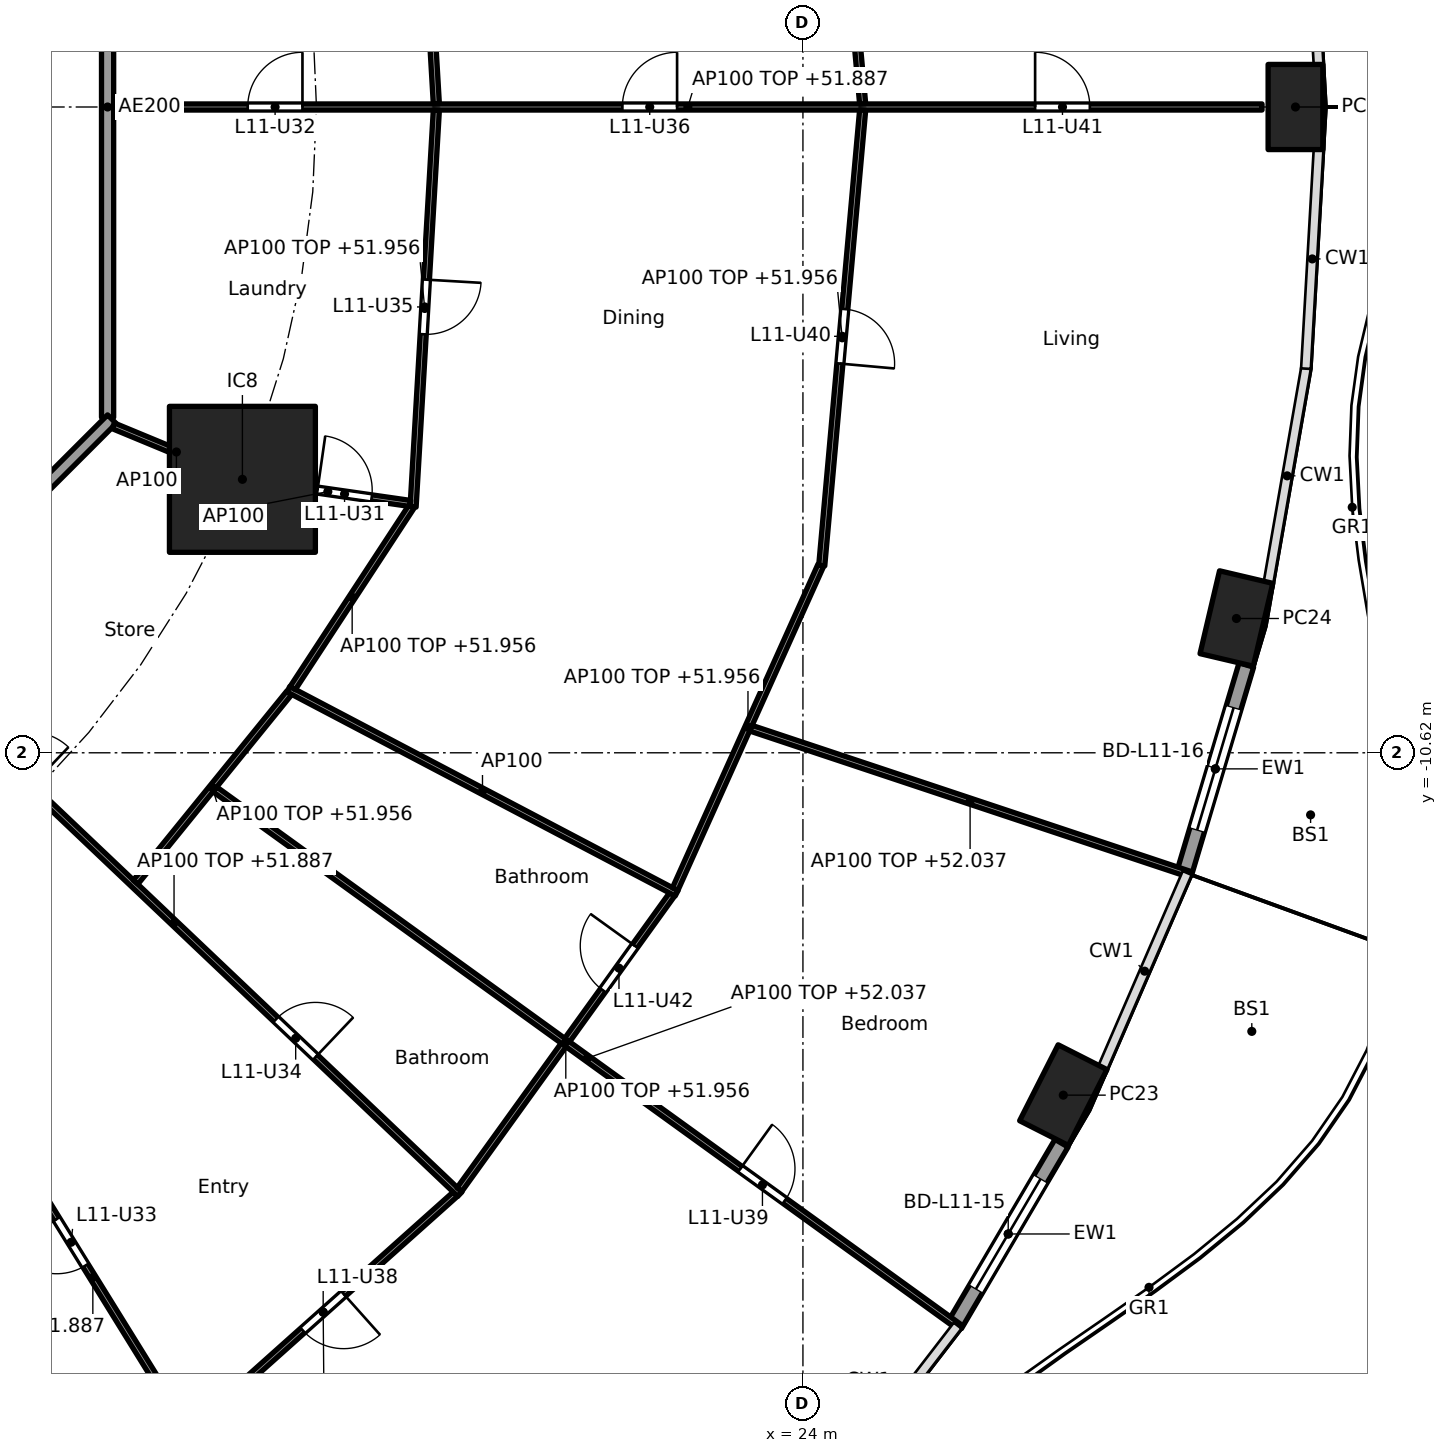
"""IFC4 building model, lengths in metres.
Left out: names, types, materials, properties, quantities, classifications, styles, units other than length and angle.
Written with IfcOpenShell. Run it as: python <this file> out.ifc"""

import sys

from ifc_helpers import new_model, si_unit, direction, frame, frame_2d, origin, origin_2d, place, context, subcontext, project, spatial, rectangle, hollow_rectangle, extrude, element, fill, save


model = new_model("IFC4")
c1 = context("Model", 3, precision=1e-05, world=origin(), true_north=direction((0.0, 1.0)))
c2 = subcontext(c1, "Body", "Model", "MODEL_VIEW")
j1 = project(units=[si_unit("LENGTHUNIT", "METRE"), si_unit("PLANEANGLEUNIT", "RADIAN")], contexts=[c1])
p1 = place(None, origin())
s1 = spatial("IfcSite", under=j1, at=p1, CompositionType="ELEMENT")
p2 = place(p1, origin())
s2 = spatial("IfcBuilding", under=s1, at=p2, CompositionType="ELEMENT")
p3 = place(p2, frame((0.0, 0.0, 49.2)))
s3 = spatial("IfcBuildingStorey", under=s2, at=p3, CompositionType="ELEMENT", Elevation=49.2)
for number, where, z_axis, x_axis in (
    (1, (32.1, 0.0, 0.0), (0.0, 0.0, 1.0), (0.0, 1.0, 0.0)),
    (2, (28.282, -16.25, 0.0), (0.0, 0.0, 1.0), (0.452, 0.892, 0.0)),
    (3, (31.129, -8.412, 0.0), (0.0, 0.0, 1.0), (0.229, 0.973, 0.0)),
):
    element("IfcColumn", number, at=place(p3, frame(where, z_axis=z_axis, x_axis=x_axis)), inside=s3, PredefinedType="COLUMN", context=c2, shape_type="SweptSolid", body=[
        extrude(hollow_rectangle(XDim=1.4, YDim=0.9, WallThickness=0.05, at=origin_2d()), origin(), (0.0, 0.0, 1.0), 3.7),
    ])
p4 = place(p3, frame((14.782, -6.123, 0.0), z_axis=(0.0, 0.0, 1.0), x_axis=(1.0, 0.0, 0.0)))
e4 = element("IfcColumn", 4, at=p4, inside=s3, PredefinedType="COLUMN", context=c2, shape_type="SweptSolid", body=[
    extrude(rectangle(XDim=2.4, YDim=2.4, at=origin_2d()), origin(), (0.0, 0.0, 1.0), 3.7),
])
p5 = place(p3, frame((28.252, -17.04, 0.0), z_axis=(0.0, 0.0, 1.0), x_axis=(-0.506311160839, -0.862350861546, 0.0)))
e5 = element("IfcWall", 5, at=p5, inside=s3, PredefinedType="SOLIDWALL", context=c2, shape_type="SweptSolid", body=[
    extrude(rectangle(XDim=3.462, YDim=0.25, at=frame_2d((1.731, 0.0))), origin(), (0.0, 0.0, 1.0), 3.44),
])
p6 = place(p5, frame((0.681, 0.0, 0.0)))
e6 = element("IfcOpeningElement", 6, at=p6, cuts=e5, PredefinedType="OPENING", context=c2, shape_type="SweptSolid", body=[
    extrude(rectangle(XDim=2.1, YDim=2.4, at=frame_2d((1.05, 1.2))), frame((0.0, 0.135, 0.0), z_axis=(0.0, -1.0, 0.0), x_axis=(1.0, 0.0, 0.0)), (0.0, 0.0, 1.0), 0.27),
])
p7 = place(p3, frame((31.292, -9.176, 0.0), z_axis=(0.0, 0.0, 1.0), x_axis=(-0.285871309426, -0.958268018065, 0.0)))
e7 = element("IfcWall", 7, at=p7, inside=s3, PredefinedType="SOLIDWALL", context=c2, shape_type="SweptSolid", body=[
    extrude(rectangle(XDim=3.565, YDim=0.25, at=frame_2d((1.783, 0.0))), origin(), (0.0, 0.0, 1.0), 3.44),
])
p8 = place(p7, frame((0.733, 0.0, 0.0)))
e8 = element("IfcOpeningElement", 8, at=p8, cuts=e7, PredefinedType="OPENING", context=c2, shape_type="SweptSolid", body=[
    extrude(rectangle(XDim=2.1, YDim=2.4, at=frame_2d((1.05, 1.2))), frame((0.0, 0.135, 0.0), z_axis=(0.0, -1.0, 0.0), x_axis=(1.0, 0.0, 0.0)), (0.0, 0.0, 1.0), 0.27),
])
p9 = place(p3, frame((12.565, -5.104, 0.0), z_axis=(0.0, 0.0, 1.0), x_axis=(0.0, 1.0, 0.0)))
e9 = element("IfcWall", 9, at=p9, inside=s3, PredefinedType="PARTITIONING", context=c2, shape_type="SweptSolid", body=[
    extrude(rectangle(XDim=10.209, YDim=0.2, at=frame_2d((5.104, 0.0))), origin(), (0.0, 0.0, 1.0), 3.44),
])
p10 = place(p3, frame((5.275, -12.494, 0.0), z_axis=(0.0, 0.0, 1.0), x_axis=(0.707106781187, 0.707106781187, 0.0)))
e10 = element("IfcWall", 10, at=p10, inside=s3, PredefinedType="PARTITIONING", context=c2, shape_type="SweptSolid", body=[
    extrude(rectangle(XDim=10.409, YDim=0.2, at=frame_2d((5.205, 0.0))), origin(), (0.0, 0.0, 1.0), 3.44),
])
p11 = place(p10, frame((3.303, 0.0, 0.0)))
e11 = element("IfcOpeningElement", 11, at=p11, cuts=e10, PredefinedType="OPENING", context=c2, shape_type="SweptSolid", body=[
    extrude(rectangle(XDim=1.0, YDim=2.1, at=frame_2d((0.5, 1.05))), frame((0.0, 0.11, 0.0), z_axis=(0.0, -1.0, 0.0), x_axis=(1.0, 0.0, 0.0)), (0.0, 0.0, 1.0), 0.22),
])
p12 = place(p3, frame((12.665, 0.0, 0.0), z_axis=(0.0, 0.0, 1.0), x_axis=(1.0, 0.0, 0.0)))
e12 = element("IfcWall", 12, at=p12, inside=s3, PredefinedType="PARTITIONING", context=c2, shape_type="SweptSolid", body=[
    extrude(rectangle(XDim=18.885, YDim=0.1, at=frame_2d((9.443, 0.0))), origin(), (0.0, 0.0, 1.0), 2.687),
])
p13 = place(p12, frame((2.205, 0.0, 0.0)))
e13 = element("IfcOpeningElement", 13, at=p13, cuts=e12, PredefinedType="OPENING", context=c2, shape_type="SweptSolid", body=[
    extrude(rectangle(XDim=0.9, YDim=2.1, at=frame_2d((0.45, 1.05))), frame((0.0, 0.06, 0.0), z_axis=(0.0, -1.0, 0.0), x_axis=(1.0, 0.0, 0.0)), (0.0, 0.0, 1.0), 0.12),
])
p14 = place(p12, frame((8.366, 0.0, 0.0)))
e14 = element("IfcOpeningElement", 14, at=p14, cuts=e12, PredefinedType="OPENING", context=c2, shape_type="SweptSolid", body=[
    extrude(rectangle(XDim=0.9, YDim=2.1, at=frame_2d((0.45, 1.05))), frame((0.0, 0.06, 0.0), z_axis=(0.0, -1.0, 0.0), x_axis=(1.0, 0.0, 0.0)), (0.0, 0.0, 1.0), 0.12),
])
p15 = place(p12, frame((15.154, 0.0, 0.0)))
e15 = element("IfcOpeningElement", 15, at=p15, cuts=e12, PredefinedType="OPENING", context=c2, shape_type="SweptSolid", body=[
    extrude(rectangle(XDim=0.9, YDim=2.1, at=frame_2d((0.45, 1.05))), frame((0.0, 0.06, 0.0), z_axis=(0.0, -1.0, 0.0), x_axis=(1.0, 0.0, 0.0)), (0.0, 0.0, 1.0), 0.12),
])
p16 = place(p3, frame((17.971, 0.05, 0.0), z_axis=(0.0, 0.0, 1.0), x_axis=(-0.058513659907, 0.998286607946, 0.0)))
e16 = element("IfcWall", 16, at=p16, inside=s3, PredefinedType="PARTITIONING", context=c2, shape_type="SweptSolid", body=[
    extrude(rectangle(XDim=6.388, YDim=0.1, at=frame_2d((3.194, 0.0))), origin(), (0.0, 0.0, 1.0), 2.756),
])
p17 = place(p3, frame((17.971, -0.05, 0.0), z_axis=(0.0, 0.0, 1.0), x_axis=(-0.058476853647, -0.998288764631, 0.0)))
e17 = element("IfcWall", 17, at=p17, inside=s3, PredefinedType="PARTITIONING", context=c2, shape_type="SweptSolid", body=[
    extrude(rectangle(XDim=6.538, YDim=0.1, at=frame_2d((3.269, 0.0))), origin(), (0.0, 0.0, 1.0), 2.756),
])
p18 = place(p17, frame((2.794, 0.0, 0.0)))
e18 = element("IfcOpeningElement", 18, at=p18, cuts=e17, PredefinedType="OPENING", context=c2, shape_type="SweptSolid", body=[
    extrude(rectangle(XDim=0.9, YDim=2.1, at=frame_2d((0.45, 1.05))), frame((0.0, 0.06, 0.0), z_axis=(0.0, -1.0, 0.0), x_axis=(1.0, 0.0, 0.0)), (0.0, 0.0, 1.0), 0.12),
])
p19 = place(p3, frame((24.982, 0.05, 0.0), z_axis=(0.0, 0.0, 1.0), x_axis=(-0.08944290521, 0.995991951126, 0.0)))
e19 = element("IfcWall", 19, at=p19, inside=s3, PredefinedType="PARTITIONING", context=c2, shape_type="SweptSolid", body=[
    extrude(rectangle(XDim=7.373, YDim=0.1, at=frame_2d((3.686, 0.0))), origin(), (0.0, 0.0, 1.0), 2.756),
])
p20 = place(p3, frame((24.982, -0.05, 0.0), z_axis=(0.0, 0.0, 1.0), x_axis=(-0.089444214321, -0.995991833563, 0.0)))
e20 = element("IfcWall", 20, at=p20, inside=s3, PredefinedType="PARTITIONING", context=c2, shape_type="SweptSolid", body=[
    extrude(rectangle(XDim=7.523, YDim=0.1, at=frame_2d((3.761, 0.0))), origin(), (0.0, 0.0, 1.0), 2.756),
])
p21 = place(p20, frame((3.286, 0.0, 0.0)))
e21 = element("IfcOpeningElement", 21, at=p21, cuts=e20, PredefinedType="OPENING", context=c2, shape_type="SweptSolid", body=[
    extrude(rectangle(XDim=0.9, YDim=2.1, at=frame_2d((0.45, 1.05))), frame((0.0, 0.06, 0.0), z_axis=(0.0, -1.0, 0.0), x_axis=(1.0, 0.0, 0.0)), (0.0, 0.0, 1.0), 0.12),
])
p22 = place(p3, frame((7.097, -10.81, 0.0), z_axis=(0.0, 0.0, 1.0), x_axis=(0.526453266471, -0.850204068576, 0.0)))
e22 = element("IfcWall", 22, at=p22, inside=s3, PredefinedType="PARTITIONING", context=c2, shape_type="SweptSolid", body=[
    extrude(rectangle(XDim=19.85, YDim=0.1, at=frame_2d((9.925, 0.0))), origin(), (0.0, 0.0, 1.0), 2.687),
])
p23 = place(p22, frame((0.35, 0.0, 0.0)))
e23 = element("IfcOpeningElement", 23, at=p23, cuts=e22, PredefinedType="OPENING", context=c2, shape_type="SweptSolid", body=[
    extrude(rectangle(XDim=0.9, YDim=2.1, at=frame_2d((0.45, 1.05))), frame((0.0, 0.06, 0.0), z_axis=(0.0, -1.0, 0.0), x_axis=(1.0, 0.0, 0.0)), (0.0, 0.0, 1.0), 0.12),
])
p24 = place(p22, frame((8.795, 0.0, 0.0)))
e24 = element("IfcOpeningElement", 24, at=p24, cuts=e22, PredefinedType="OPENING", context=c2, shape_type="SweptSolid", body=[
    extrude(rectangle(XDim=0.9, YDim=2.1, at=frame_2d((0.45, 1.05))), frame((0.0, 0.06, 0.0), z_axis=(0.0, -1.0, 0.0), x_axis=(1.0, 0.0, 0.0)), (0.0, 0.0, 1.0), 0.12),
])
p25 = place(p3, frame((13.936, -21.761, 0.0), z_axis=(0.0, 0.0, 1.0), x_axis=(0.745806142791, 0.666163041136, 0.0)))
e25 = element("IfcWall", 25, at=p25, inside=s3, PredefinedType="PARTITIONING", context=c2, shape_type="SweptSolid", body=[
    extrude(rectangle(XDim=5.831, YDim=0.1, at=frame_2d((2.915, 0.0))), origin(), (0.0, 0.0, 1.0), 2.756),
])
p26 = place(p25, frame((2.465, 0.0, 0.0)))
e26 = element("IfcOpeningElement", 26, at=p26, cuts=e25, PredefinedType="OPENING", context=c2, shape_type="SweptSolid", body=[
    extrude(rectangle(XDim=0.9, YDim=2.1, at=frame_2d((0.45, 1.05))), frame((0.0, 0.06, 0.0), z_axis=(0.0, -1.0, 0.0), x_axis=(1.0, 0.0, 0.0)), (0.0, 0.0, 1.0), 0.12),
])
p27 = place(p3, frame((8.957, -8.953, 0.0), z_axis=(0.0, 0.0, 1.0), x_axis=(0.725250022034, -0.688485588476, 0.0)))
e27 = element("IfcWall", 27, at=p27, inside=s3, PredefinedType="PARTITIONING", context=c2, shape_type="SweptSolid", body=[
    extrude(rectangle(XDim=12.963, YDim=0.1, at=frame_2d((6.481, 0.0))), origin(), (0.0, 0.0, 1.0), 2.687),
])
p28 = place(p27, frame((2.333, 0.0, 0.0)))
e28 = element("IfcOpeningElement", 28, at=p28, cuts=e27, PredefinedType="OPENING", context=c2, shape_type="SweptSolid", body=[
    extrude(rectangle(XDim=0.9, YDim=2.1, at=frame_2d((0.45, 1.05))), frame((0.0, 0.06, 0.0), z_axis=(0.0, -1.0, 0.0), x_axis=(1.0, 0.0, 0.0)), (0.0, 0.0, 1.0), 0.12),
])
p29 = place(p27, frame((8.79, 0.0, 0.0)))
e29 = element("IfcOpeningElement", 29, at=p29, cuts=e27, PredefinedType="OPENING", context=c2, shape_type="SweptSolid", body=[
    extrude(rectangle(XDim=0.9, YDim=2.1, at=frame_2d((0.45, 1.05))), frame((0.0, 0.06, 0.0), z_axis=(0.0, -1.0, 0.0), x_axis=(1.0, 0.0, 0.0)), (0.0, 0.0, 1.0), 0.12),
])
p30 = place(p3, frame((13.026, -12.747, 0.0), z_axis=(0.0, 0.0, 1.0), x_axis=(0.630126826288, 0.776492229705, 0.0)))
e30 = element("IfcWall", 30, at=p30, inside=s3, PredefinedType="PARTITIONING", context=c2, shape_type="SweptSolid", body=[
    extrude(rectangle(XDim=4.007, YDim=0.1, at=frame_2d((2.003, 0.0))), origin(), (0.0, 0.0, 1.0), 2.756),
])
p31 = place(p3, frame((18.351, -17.803, 0.0), z_axis=(0.0, 0.0, 1.0), x_axis=(0.584563700282, 0.811347817099, 0.0)))
e31 = element("IfcWall", 31, at=p31, inside=s3, PredefinedType="PARTITIONING", context=c2, shape_type="SweptSolid", body=[
    extrude(rectangle(XDim=5.984, YDim=0.1, at=frame_2d((2.992, 0.0))), origin(), (0.0, 0.0, 1.0), 2.756),
])
p32 = place(p31, frame((4.038, 0.0, 0.0)))
e32 = element("IfcOpeningElement", 32, at=p32, cuts=e31, PredefinedType="OPENING", context=c2, shape_type="SweptSolid", body=[
    extrude(rectangle(XDim=0.9, YDim=2.1, at=frame_2d((0.45, 1.05))), frame((0.0, 0.06, 0.0), z_axis=(0.0, -1.0, 0.0), x_axis=(1.0, 0.0, 0.0)), (0.0, 0.0, 1.0), 0.12),
])
p33 = place(p3, frame((14.329, -11.221, 0.0), z_axis=(0.0, 0.0, 1.0), x_axis=(0.810671130917, -0.58550176558, 0.0)))
e33 = element("IfcWall", 33, at=p33, inside=s3, PredefinedType="PARTITIONING", context=c2, shape_type="SweptSolid", body=[
    extrude(rectangle(XDim=15.106, YDim=0.1, at=frame_2d((7.553, 0.0))), origin(), (0.0, 0.0, 1.0), 2.837),
])
p34 = place(p33, frame((10.659, 0.0, 0.0)))
e34 = element("IfcOpeningElement", 34, at=p34, cuts=e33, PredefinedType="OPENING", context=c2, shape_type="SweptSolid", body=[
    extrude(rectangle(XDim=0.9, YDim=2.1, at=frame_2d((0.45, 1.05))), frame((0.0, 0.06, 0.0), z_axis=(0.0, -1.0, 0.0), x_axis=(1.0, 0.0, 0.0)), (0.0, 0.0, 1.0), 0.12),
])
p35 = place(p3, frame((15.538, -9.574, 0.0), z_axis=(0.0, 0.0, 1.0), x_axis=(0.88517945493, -0.465249752895, 0.0)))
e35 = element("IfcWall", 35, at=p35, inside=s3, PredefinedType="PARTITIONING", context=c2, shape_type="SweptSolid", body=[
    extrude(rectangle(XDim=7.213, YDim=0.1, at=frame_2d((3.606, 0.0))), origin(), (0.0, 0.0, 1.0), 3.44),
])
p36 = place(p3, frame((15.609, -9.556, 0.0), z_axis=(0.0, 0.0, 1.0), x_axis=(0.547641765292, 0.836712911881, 0.0)))
e36 = element("IfcWall", 36, at=p36, inside=s3, PredefinedType="PARTITIONING", context=c2, shape_type="SweptSolid", body=[
    extrude(rectangle(XDim=3.57, YDim=0.1, at=frame_2d((1.785, 0.0))), origin(), (0.0, 0.0, 1.0), 2.756),
])
p37 = place(p3, frame((21.899, -12.861, 0.0), z_axis=(0.0, 0.0, 1.0), x_axis=(0.410197710154, 0.911996622025, 0.0)))
e37 = element("IfcWall", 37, at=p37, inside=s3, PredefinedType="PARTITIONING", context=c2, shape_type="SweptSolid", body=[
    extrude(rectangle(XDim=5.837, YDim=0.1, at=frame_2d((2.918, 0.0))), origin(), (0.0, 0.0, 1.0), 2.756),
])
p38 = place(p3, frame((23.144, -10.216, 0.0), z_axis=(0.0, 0.0, 1.0), x_axis=(0.948811715359, -0.315842253027, 0.0)))
e38 = element("IfcWall", 38, at=p38, inside=s3, PredefinedType="PARTITIONING", context=c2, shape_type="SweptSolid", body=[
    extrude(rectangle(XDim=7.6, YDim=0.1, at=frame_2d((3.8, 0.0))), origin(), (0.0, 0.0, 1.0), 2.837),
])
p39 = place(p3, frame((12.657, -5.243, 0.0), z_axis=(0.0, 0.0, 1.0), x_axis=(0.923864733477, -0.382719158442, 0.0)))
e39 = element("IfcWall", 39, at=p39, inside=s3, PredefinedType="PARTITIONING", context=c2, shape_type="SweptSolid", body=[
    extrude(rectangle(XDim=2.25, YDim=0.1, at=frame_2d((1.125, 0.0))), origin(), (0.0, 0.0, 1.0), 3.44),
])
p40 = place(p3, frame((14.832, -6.13, 0.0), z_axis=(0.0, 0.0, 1.0), x_axis=(0.989840446863, -0.142182593007, 0.0)))
e40 = element("IfcWall", 40, at=p40, inside=s3, PredefinedType="PARTITIONING", context=c2, shape_type="SweptSolid", body=[
    extrude(rectangle(XDim=2.739, YDim=0.1, at=frame_2d((1.369, 0.0))), origin(), (0.0, 0.0, 1.0), 3.44),
])
p41 = place(p40, frame((1.197, 0.0, 0.0)))
e41 = element("IfcOpeningElement", 41, at=p41, cuts=e40, PredefinedType="OPENING", context=c2, shape_type="SweptSolid", body=[
    extrude(rectangle(XDim=0.9, YDim=2.1, at=frame_2d((0.45, 1.05))), frame((0.0, 0.06, 0.0), z_axis=(0.0, -1.0, 0.0), x_axis=(1.0, 0.0, 0.0)), (0.0, 0.0, 1.0), 0.12),
])
p42 = place(p6, origin())
e42 = element("IfcDoor", 42, at=p42, inside=s3, OperationType="SLIDING_TO_LEFT", PredefinedType="DOOR", context=c2, shape_type="SweptSolid", body=[
    extrude(rectangle(XDim=2.1, YDim=2.4, at=frame_2d((1.05, 1.2))), frame((0.0, 0.025, 0.0), z_axis=(0.0, -1.0, 0.0), x_axis=(1.0, 0.0, 0.0)), (0.0, 0.0, 1.0), 0.05),
])
fill(e6, e42)
p43 = place(p8, origin())
e43 = element("IfcDoor", 43, at=p43, inside=s3, OperationType="SLIDING_TO_LEFT", PredefinedType="DOOR", context=c2, shape_type="SweptSolid", body=[
    extrude(rectangle(XDim=2.1, YDim=2.4, at=frame_2d((1.05, 1.2))), frame((0.0, 0.025, 0.0), z_axis=(0.0, -1.0, 0.0), x_axis=(1.0, 0.0, 0.0)), (0.0, 0.0, 1.0), 0.05),
])
fill(e8, e43)
p44 = place(p41, origin())
e44 = element("IfcDoor", 44, at=p44, inside=s3, OperationType="SINGLE_SWING_LEFT", PredefinedType="DOOR", context=c2, shape_type="SweptSolid", body=[
    extrude(rectangle(XDim=0.9, YDim=2.1, at=frame_2d((0.45, 1.05))), frame((0.0, 0.025, 0.0), z_axis=(0.0, -1.0, 0.0), x_axis=(1.0, 0.0, 0.0)), (0.0, 0.0, 1.0), 0.05),
])
fill(e41, e44)
p45 = place(p13, origin())
e45 = element("IfcDoor", 45, at=p45, inside=s3, OperationType="SINGLE_SWING_RIGHT", PredefinedType="DOOR", context=c2, shape_type="SweptSolid", body=[
    extrude(rectangle(XDim=0.9, YDim=2.1, at=frame_2d((0.45, 1.05))), frame((0.0, 0.025, 0.0), z_axis=(0.0, -1.0, 0.0), x_axis=(1.0, 0.0, 0.0)), (0.0, 0.0, 1.0), 0.05),
])
fill(e13, e45)
p46 = place(p24, frame((0.9, 0.0, 0.0), x_axis=(-1.0, 0.0, 0.0)))
e46 = element("IfcDoor", 46, at=p46, inside=s3, OperationType="SINGLE_SWING_RIGHT", PredefinedType="DOOR", context=c2, shape_type="SweptSolid", body=[
    extrude(rectangle(XDim=0.9, YDim=2.1, at=frame_2d((0.45, 1.05))), frame((0.0, 0.025, 0.0), z_axis=(0.0, -1.0, 0.0), x_axis=(1.0, 0.0, 0.0)), (0.0, 0.0, 1.0), 0.05),
])
fill(e24, e46)
p47 = place(p29, origin())
e47 = element("IfcDoor", 47, at=p47, inside=s3, OperationType="SINGLE_SWING_RIGHT", PredefinedType="DOOR", context=c2, shape_type="SweptSolid", body=[
    extrude(rectangle(XDim=0.9, YDim=2.1, at=frame_2d((0.45, 1.05))), frame((0.0, 0.025, 0.0), z_axis=(0.0, -1.0, 0.0), x_axis=(1.0, 0.0, 0.0)), (0.0, 0.0, 1.0), 0.05),
])
fill(e29, e47)
p48 = place(p18, origin())
e48 = element("IfcDoor", 48, at=p48, inside=s3, OperationType="SINGLE_SWING_LEFT", PredefinedType="DOOR", context=c2, shape_type="SweptSolid", body=[
    extrude(rectangle(XDim=0.9, YDim=2.1, at=frame_2d((0.45, 1.05))), frame((0.0, 0.025, 0.0), z_axis=(0.0, -1.0, 0.0), x_axis=(1.0, 0.0, 0.0)), (0.0, 0.0, 1.0), 0.05),
])
fill(e18, e48)
p49 = place(p14, origin())
e49 = element("IfcDoor", 49, at=p49, inside=s3, OperationType="SINGLE_SWING_RIGHT", PredefinedType="DOOR", context=c2, shape_type="SweptSolid", body=[
    extrude(rectangle(XDim=0.9, YDim=2.1, at=frame_2d((0.45, 1.05))), frame((0.0, 0.025, 0.0), z_axis=(0.0, -1.0, 0.0), x_axis=(1.0, 0.0, 0.0)), (0.0, 0.0, 1.0), 0.05),
])
fill(e14, e49)
p50 = place(p26, frame((0.9, 0.0, 0.0), x_axis=(-1.0, 0.0, 0.0)))
e50 = element("IfcDoor", 50, at=p50, inside=s3, OperationType="SINGLE_SWING_LEFT", PredefinedType="DOOR", context=c2, shape_type="SweptSolid", body=[
    extrude(rectangle(XDim=0.9, YDim=2.1, at=frame_2d((0.45, 1.05))), frame((0.0, 0.025, 0.0), z_axis=(0.0, -1.0, 0.0), x_axis=(1.0, 0.0, 0.0)), (0.0, 0.0, 1.0), 0.05),
])
fill(e26, e50)
p51 = place(p34, origin())
e51 = element("IfcDoor", 51, at=p51, inside=s3, OperationType="SINGLE_SWING_LEFT", PredefinedType="DOOR", context=c2, shape_type="SweptSolid", body=[
    extrude(rectangle(XDim=0.9, YDim=2.1, at=frame_2d((0.45, 1.05))), frame((0.0, 0.025, 0.0), z_axis=(0.0, -1.0, 0.0), x_axis=(1.0, 0.0, 0.0)), (0.0, 0.0, 1.0), 0.05),
])
fill(e34, e51)
p52 = place(p21, origin())
e52 = element("IfcDoor", 52, at=p52, inside=s3, OperationType="SINGLE_SWING_RIGHT", PredefinedType="DOOR", context=c2, shape_type="SweptSolid", body=[
    extrude(rectangle(XDim=0.9, YDim=2.1, at=frame_2d((0.45, 1.05))), frame((0.0, 0.025, 0.0), z_axis=(0.0, -1.0, 0.0), x_axis=(1.0, 0.0, 0.0)), (0.0, 0.0, 1.0), 0.05),
])
fill(e21, e52)
p53 = place(p15, origin())
e53 = element("IfcDoor", 53, at=p53, inside=s3, OperationType="SINGLE_SWING_LEFT", PredefinedType="DOOR", context=c2, shape_type="SweptSolid", body=[
    extrude(rectangle(XDim=0.9, YDim=2.1, at=frame_2d((0.45, 1.05))), frame((0.0, 0.025, 0.0), z_axis=(0.0, -1.0, 0.0), x_axis=(1.0, 0.0, 0.0)), (0.0, 0.0, 1.0), 0.05),
])
fill(e15, e53)
p54 = place(p32, origin())
e54 = element("IfcDoor", 54, at=p54, inside=s3, OperationType="SINGLE_SWING_RIGHT", PredefinedType="DOOR", context=c2, shape_type="SweptSolid", body=[
    extrude(rectangle(XDim=0.9, YDim=2.1, at=frame_2d((0.45, 1.05))), frame((0.0, 0.025, 0.0), z_axis=(0.0, -1.0, 0.0), x_axis=(1.0, 0.0, 0.0)), (0.0, 0.0, 1.0), 0.05),
])
fill(e32, e54)
save(model, sys.argv[1])
